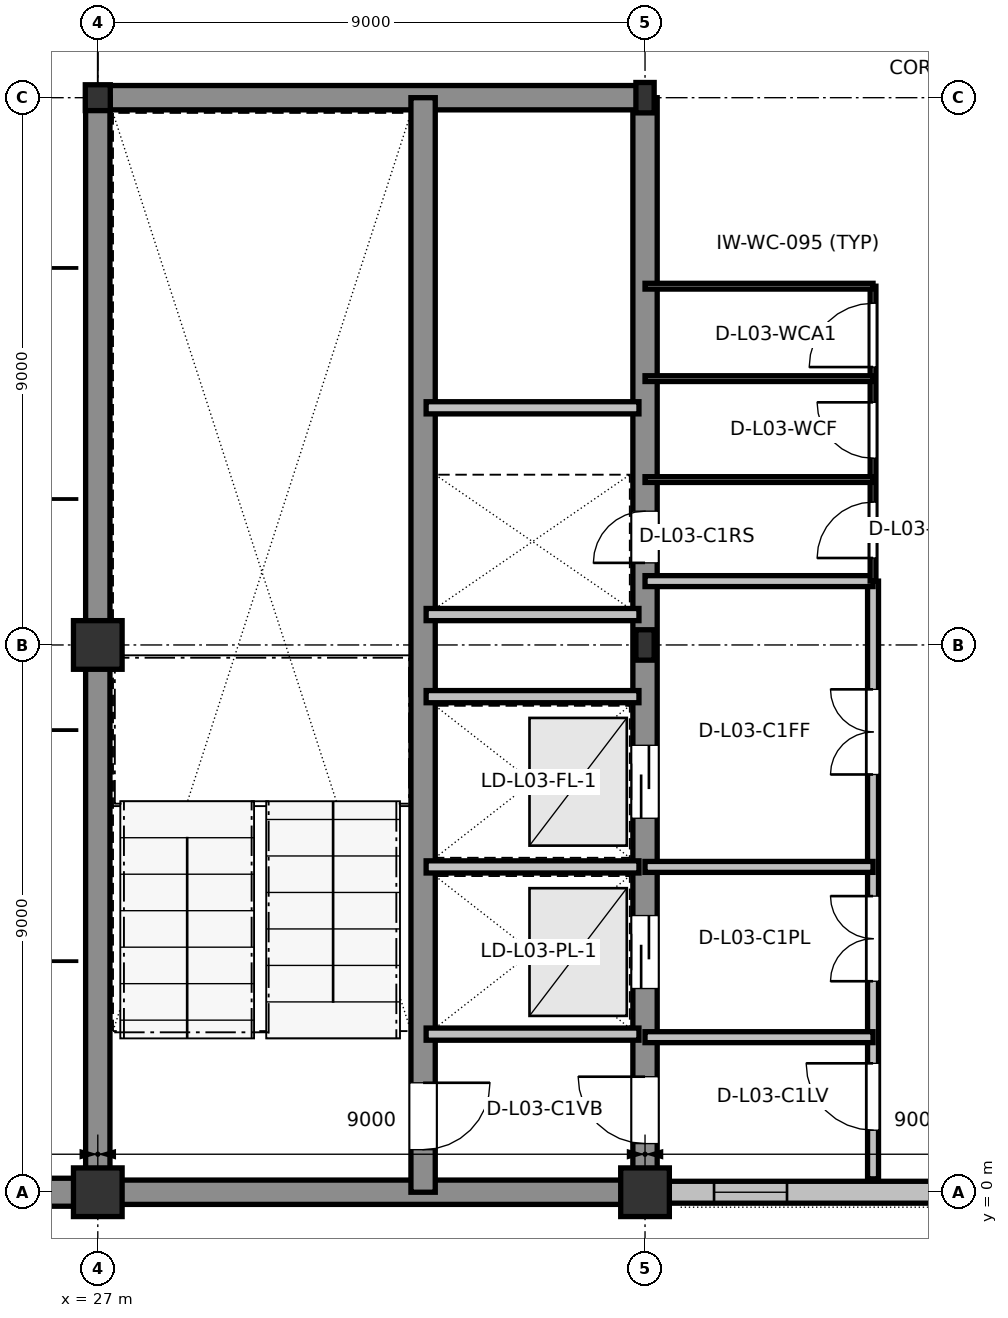
"""IFC4 building model, lengths in metres.
Left out: names, types, materials, properties, quantities, classifications, styles, units other than length and angle.
Written with IfcOpenShell. Run it as: python <this file> out.ifc"""

import sys

from ifc_helpers import new_model, si_unit, direction, frame, frame_2d, origin, origin_2d, place, context, subcontext, project, spatial, rectangle, i_section, extrude, element, fill, save


model = new_model("IFC4")
c1 = context("Model", 3, precision=1e-05, world=origin(), true_north=direction((0.0, 1.0)))
c2 = subcontext(c1, "Body", "Model", "MODEL_VIEW")
j1 = project(units=[si_unit("LENGTHUNIT", "METRE"), si_unit("PLANEANGLEUNIT", "RADIAN")], contexts=[c1])
p1 = place(None, origin())
s1 = spatial("IfcSite", under=j1, at=p1, CompositionType="ELEMENT")
p2 = place(p1, origin())
s2 = spatial("IfcBuilding", under=s1, at=p2, CompositionType="ELEMENT")
p3 = place(p2, frame((0.0, 0.0, 15.0)))
s3 = spatial("IfcBuildingStorey", under=s2, at=p3, CompositionType="ELEMENT", Elevation=15.0)
for number, where, z_axis, x_axis in (
    (1, (27.0, 0.0, 0.0), (0.0, 0.0, 1.0), (1.0, 0.0, 0.0)),
    (2, (27.0, 9.0, 0.0), (0.0, 0.0, 1.0), (1.0, 0.0, 0.0)),
):
    element("IfcColumn", number, at=place(p3, frame(where, z_axis=z_axis, x_axis=x_axis)), inside=s3, PredefinedType="COLUMN", context=c2, shape_type="SweptSolid", body=[
        extrude(rectangle(XDim=0.8, YDim=0.8, at=origin_2d()), origin(), (0.0, 0.0, 1.0), 4.2),
    ])
p4 = place(p3, frame((27.0, 18.0, 0.0), z_axis=(0.0, 0.0, 1.0), x_axis=(1.0, 0.0, 0.0)))
e3 = element("IfcColumn", 3, at=p4, inside=s3, PredefinedType="COLUMN", context=c2, shape_type="SweptSolid", body=[
    extrude(i_section(OverallWidth=0.411, OverallDepth=0.425, WebThickness=0.021, FlangeThickness=0.032, at=origin_2d()), origin(), (0.0, 0.0, 1.0), 4.2),
])
p5 = place(p3, frame((36.0, 0.0, 0.0), z_axis=(0.0, 0.0, 1.0), x_axis=(1.0, 0.0, 0.0)))
e4 = element("IfcColumn", 4, at=p5, inside=s3, PredefinedType="COLUMN", context=c2, shape_type="SweptSolid", body=[
    extrude(rectangle(XDim=0.8, YDim=0.8, at=origin_2d()), origin(), (0.0, 0.0, 1.0), 4.2),
])
for number, where, z_axis, x_axis in (
    (5, (36.0, 9.0, 0.0), (0.0, 0.0, 1.0), (1.0, 0.0, 0.0)),
    (6, (36.0, 18.0, 0.0), (0.0, 0.0, 1.0), (1.0, 0.0, 0.0)),
):
    element("IfcColumn", number, at=place(p3, frame(where, z_axis=z_axis, x_axis=x_axis)), inside=s3, PredefinedType="COLUMN", context=c2, shape_type="SweptSolid", body=[
        extrude(i_section(OverallWidth=0.3, OverallDepth=0.5, WebThickness=0.014, FlangeThickness=0.028, at=origin_2d()), origin(), (0.0, 0.0, 1.0), 4.2),
    ])
p6 = place(p3, frame((18.285, 0.0, 0.0), z_axis=(0.0, 0.0, 1.0), x_axis=(1.0, 0.0, 0.0)))
e7 = element("IfcWall", 7, at=p6, inside=s3, PredefinedType="STANDARD", context=c2, shape_type="SweptSolid", body=[
    extrude(rectangle(XDim=8.33, YDim=0.46, at=frame_2d((4.165, 0.0))), origin(), (0.0, 0.0, 1.0), 3.625),
])
p7 = place(p3, frame((36.385, 0.0, 0.0), z_axis=(0.0, 0.0, 1.0), x_axis=(1.0, 0.0, 0.0)))
e8 = element("IfcWall", 8, at=p7, inside=s3, PredefinedType="STANDARD", context=c2, shape_type="SweptSolid", body=[
    extrude(rectangle(XDim=8.23, YDim=0.36, at=frame_2d((4.115, 0.0))), origin(), (0.0, 0.0, 1.0), 3.635),
])
p8 = place(p7, frame((0.75, 0.0, 0.9)))
e9 = element("IfcOpeningElement", 9, at=p8, cuts=e8, PredefinedType="OPENING", context=c2, shape_type="SweptSolid", body=[
    extrude(rectangle(XDim=1.2, YDim=1.4, at=frame_2d((0.6, 0.7))), frame((0.0, 0.19, 0.0), z_axis=(0.0, -1.0, 0.0), x_axis=(1.0, 0.0, 0.0)), (0.0, 0.0, 1.0), 0.38),
])
p9 = place(p3, frame((27.0, 0.0, 0.0), z_axis=(0.0, 0.0, 1.0), x_axis=(1.0, 0.0, 0.0)))
e10 = element("IfcWall", 10, at=p9, inside=s3, PredefinedType="SHEAR", context=c2, shape_type="SweptSolid", body=[
    extrude(rectangle(XDim=9.0, YDim=0.4, at=frame_2d((4.5, 0.0))), origin(), (0.0, 0.0, 1.0), 3.96),
])
p10 = place(p3, frame((36.0, 0.0, 0.0), z_axis=(0.0, 0.0, 1.0), x_axis=(0.0, 1.0, 0.0)))
e11 = element("IfcWall", 11, at=p10, inside=s3, PredefinedType="SHEAR", context=c2, shape_type="SweptSolid", body=[
    extrude(rectangle(XDim=18.0, YDim=0.4, at=frame_2d((9.0, 0.0))), origin(), (0.0, 0.0, 1.0), 3.96),
])
p11 = place(p10, frame((0.8, 0.0, 0.0)))
e12 = element("IfcOpeningElement", 12, at=p11, cuts=e11, PredefinedType="OPENING", context=c2, shape_type="SweptSolid", body=[
    extrude(rectangle(XDim=1.1, YDim=2.16, at=frame_2d((0.55, 1.08))), frame((0.0, 0.21, 0.0), z_axis=(0.0, -1.0, 0.0), x_axis=(1.0, 0.0, 0.0)), (0.0, 0.0, 1.0), 0.42),
])
p12 = place(p10, frame((3.35, 0.0, 0.0)))
e13 = element("IfcOpeningElement", 13, at=p12, cuts=e11, PredefinedType="OPENING", context=c2, shape_type="SweptSolid", body=[
    extrude(rectangle(XDim=1.2, YDim=2.2, at=frame_2d((0.6, 1.1))), frame((0.0, 0.21, 0.0), z_axis=(0.0, -1.0, 0.0), x_axis=(1.0, 0.0, 0.0)), (0.0, 0.0, 1.0), 0.42),
])
p13 = place(p10, frame((6.15, 0.0, 0.0)))
e14 = element("IfcOpeningElement", 14, at=p13, cuts=e11, PredefinedType="OPENING", context=c2, shape_type="SweptSolid", body=[
    extrude(rectangle(XDim=1.2, YDim=2.2, at=frame_2d((0.6, 1.1))), frame((0.0, 0.21, 0.0), z_axis=(0.0, -1.0, 0.0), x_axis=(1.0, 0.0, 0.0)), (0.0, 0.0, 1.0), 0.42),
])
p14 = place(p10, frame((10.35, 0.0, 0.0)))
e15 = element("IfcOpeningElement", 15, at=p14, cuts=e11, PredefinedType="OPENING", context=c2, shape_type="SweptSolid", body=[
    extrude(rectangle(XDim=0.85, YDim=2.1, at=frame_2d((0.425, 1.05))), frame((0.0, 0.21, 0.0), z_axis=(0.0, -1.0, 0.0), x_axis=(1.0, 0.0, 0.0)), (0.0, 0.0, 1.0), 0.42),
])
p15 = place(p3, frame((36.0, 18.0, 0.0), z_axis=(0.0, 0.0, 1.0), x_axis=(-1.0, 0.0, 0.0)))
e16 = element("IfcWall", 16, at=p15, inside=s3, PredefinedType="SHEAR", context=c2, shape_type="SweptSolid", body=[
    extrude(rectangle(XDim=9.0, YDim=0.4, at=frame_2d((4.5, 0.0))), origin(), (0.0, 0.0, 1.0), 3.96),
])
p16 = place(p3, frame((27.0, 18.0, 0.0), z_axis=(0.0, 0.0, 1.0), x_axis=(0.0, -1.0, 0.0)))
e17 = element("IfcWall", 17, at=p16, inside=s3, PredefinedType="SHEAR", context=c2, shape_type="SweptSolid", body=[
    extrude(rectangle(XDim=18.0, YDim=0.4, at=frame_2d((9.0, 0.0))), origin(), (0.0, 0.0, 1.0), 3.96),
])
p17 = place(p3, frame((32.35, 0.0, 0.0), z_axis=(0.0, 0.0, 1.0), x_axis=(0.0, 1.0, 0.0)))
e18 = element("IfcWall", 18, at=p17, inside=s3, PredefinedType="SHEAR", context=c2, shape_type="SweptSolid", body=[
    extrude(rectangle(XDim=18.0, YDim=0.4, at=frame_2d((9.0, 0.0))), origin(), (0.0, 0.0, 1.0), 3.96),
])
p18 = place(p17, frame((0.7, 0.0, 0.0)))
e19 = element("IfcOpeningElement", 19, at=p18, cuts=e18, PredefinedType="OPENING", context=c2, shape_type="SweptSolid", body=[
    extrude(rectangle(XDim=1.1, YDim=2.16, at=frame_2d((0.55, 1.08))), frame((0.0, 0.21, 0.0), z_axis=(0.0, -1.0, 0.0), x_axis=(1.0, 0.0, 0.0)), (0.0, 0.0, 1.0), 0.42),
])
for number, where, z_axis, x_axis in (
    (20, (32.4, 2.6, 0.0), (0.0, 0.0, 1.0), (1.0, 0.0, 0.0)),
    (21, (32.4, 5.35, 0.0), (0.0, 0.0, 1.0), (1.0, 0.0, 0.0)),
    (22, (32.4, 8.15, 0.0), (0.0, 0.0, 1.0), (1.0, 0.0, 0.0)),
    (23, (32.4, 9.5, 0.0), (0.0, 0.0, 1.0), (1.0, 0.0, 0.0)),
    (24, (32.4, 12.9, 0.0), (0.0, 0.0, 1.0), (1.0, 0.0, 0.0)),
):
    element("IfcWall", number, at=place(p3, frame(where, z_axis=z_axis, x_axis=x_axis)), inside=s3, PredefinedType="PARTITIONING", context=c2, shape_type="SweptSolid", body=[
        extrude(rectangle(XDim=3.5, YDim=0.2, at=frame_2d((1.75, 0.0))), origin(), (0.0, 0.0, 1.0), 3.96),
    ])
p19 = place(p3, frame((39.75, 0.22, 0.0), z_axis=(0.0, 0.0, 1.0), x_axis=(0.0, 1.0, 0.0)))
e25 = element("IfcWall", 25, at=p19, inside=s3, PredefinedType="PARTITIONING", context=c2, shape_type="SweptSolid", body=[
    extrude(rectangle(XDim=9.83, YDim=0.18, at=frame_2d((4.915, 0.0))), origin(), (0.0, 0.0, 1.0), 3.96),
])
p20 = place(p19, frame((0.8, 0.0, 0.0)))
e26 = element("IfcOpeningElement", 26, at=p20, cuts=e25, PredefinedType="OPENING", context=c2, shape_type="SweptSolid", body=[
    extrude(rectangle(XDim=1.1, YDim=2.16, at=frame_2d((0.55, 1.08))), frame((0.0, 0.1, 0.0), z_axis=(0.0, -1.0, 0.0), x_axis=(1.0, 0.0, 0.0)), (0.0, 0.0, 1.0), 0.2),
])
p21 = place(p19, frame((3.25, 0.0, 0.0)))
e27 = element("IfcOpeningElement", 27, at=p21, cuts=e25, PredefinedType="OPENING", context=c2, shape_type="SweptSolid", body=[
    extrude(rectangle(XDim=1.4, YDim=2.2, at=frame_2d((0.7, 1.1))), frame((0.0, 0.1, 0.0), z_axis=(0.0, -1.0, 0.0), x_axis=(1.0, 0.0, 0.0)), (0.0, 0.0, 1.0), 0.2),
])
p22 = place(p19, frame((6.65, 0.0, 0.0)))
e28 = element("IfcOpeningElement", 28, at=p22, cuts=e25, PredefinedType="OPENING", context=c2, shape_type="SweptSolid", body=[
    extrude(rectangle(XDim=1.4, YDim=2.2, at=frame_2d((0.7, 1.1))), frame((0.0, 0.1, 0.0), z_axis=(0.0, -1.0, 0.0), x_axis=(1.0, 0.0, 0.0)), (0.0, 0.0, 1.0), 0.2),
])
for number, where, z_axis, x_axis in (
    (29, (36.0, 2.55, 0.0), (0.0, 0.0, 1.0), (1.0, 0.0, 0.0)),
    (30, (36.0, 5.35, 0.0), (0.0, 0.0, 1.0), (1.0, 0.0, 0.0)),
    (31, (36.0, 10.05, 0.0), (0.0, 0.0, 1.0), (1.0, 0.0, 0.0)),
):
    element("IfcWall", number, at=place(p3, frame(where, z_axis=z_axis, x_axis=x_axis)), inside=s3, PredefinedType="PARTITIONING", context=c2, shape_type="SweptSolid", body=[
        extrude(rectangle(XDim=3.75, YDim=0.18, at=frame_2d((1.875, 0.0))), origin(), (0.0, 0.0, 1.0), 3.96),
    ])
p23 = place(p3, frame((39.75, 10.05, 0.0), z_axis=(0.0, 0.0, 1.0), x_axis=(0.0, 1.0, 0.0)))
e32 = element("IfcWall", 32, at=p23, inside=s3, PredefinedType="PARTITIONING", context=c2, shape_type="SweptSolid", body=[
    extrude(rectangle(XDim=4.85, YDim=0.095, at=frame_2d((2.425, 0.0))), origin(), (0.0, 0.0, 1.0), 3.96),
])
p24 = place(p23, frame((0.38, 0.0, 0.0)))
e33 = element("IfcOpeningElement", 33, at=p24, cuts=e32, PredefinedType="OPENING", context=c2, shape_type="SweptSolid", body=[
    extrude(rectangle(XDim=0.92, YDim=2.1, at=frame_2d((0.46, 1.05))), frame((0.0, 0.057, 0.0), z_axis=(0.0, -1.0, 0.0), x_axis=(1.0, 0.0, 0.0)), (0.0, 0.0, 1.0), 0.115),
])
p25 = place(p23, frame((2.02, 0.0, 0.0)))
e34 = element("IfcOpeningElement", 34, at=p25, cuts=e32, PredefinedType="OPENING", context=c2, shape_type="SweptSolid", body=[
    extrude(rectangle(XDim=0.92, YDim=2.1, at=frame_2d((0.46, 1.05))), frame((0.0, 0.057, 0.0), z_axis=(0.0, -1.0, 0.0), x_axis=(1.0, 0.0, 0.0)), (0.0, 0.0, 1.0), 0.115),
])
p26 = place(p23, frame((3.52, 0.0, 0.0)))
e35 = element("IfcOpeningElement", 35, at=p26, cuts=e32, PredefinedType="OPENING", context=c2, shape_type="SweptSolid", body=[
    extrude(rectangle(XDim=1.05, YDim=2.13, at=frame_2d((0.525, 1.065))), frame((0.0, 0.057, 0.0), z_axis=(0.0, -1.0, 0.0), x_axis=(1.0, 0.0, 0.0)), (0.0, 0.0, 1.0), 0.115),
])
for number, where, z_axis, x_axis in (
    (36, (36.0, 11.72, 0.0), (0.0, 0.0, 1.0), (1.0, 0.0, 0.0)),
    (37, (36.0, 13.38, 0.0), (0.0, 0.0, 1.0), (1.0, 0.0, 0.0)),
):
    element("IfcWall", number, at=place(p3, frame(where, z_axis=z_axis, x_axis=x_axis)), inside=s3, PredefinedType="PARTITIONING", context=c2, shape_type="SweptSolid", body=[
        extrude(rectangle(XDim=3.75, YDim=0.095, at=frame_2d((1.875, 0.0))), origin(), (0.0, 0.0, 1.0), 3.96),
    ])
p27 = place(p3, frame((36.0, 14.9, 0.0), z_axis=(0.0, 0.0, 1.0), x_axis=(1.0, 0.0, 0.0)))
e38 = element("IfcWall", 38, at=p27, inside=s3, PredefinedType="PARTITIONING", context=c2, shape_type="SweptSolid", body=[
    extrude(rectangle(XDim=3.75, YDim=0.095, at=frame_2d((1.875, 0.0))), origin(), (0.0, 0.0, 1.0), 3.645),
])
p28 = place(p8, origin())
e39 = element("IfcWindow", 39, at=p28, inside=s3, PartitioningType="SINGLE_PANEL", PredefinedType="WINDOW", context=c2, shape_type="SweptSolid", body=[
    extrude(rectangle(XDim=1.2, YDim=1.4, at=frame_2d((0.6, 0.7))), frame((0.0, 0.03, 0.0), z_axis=(0.0, -1.0, 0.0), x_axis=(1.0, 0.0, 0.0)), (0.0, 0.0, 1.0), 0.06),
])
fill(e9, e39)
p29 = place(p18, frame((1.1, 0.0, 0.0), z_axis=(0.0, 0.0, 1.0), x_axis=(-1.0, 0.0, 0.0)))
e40 = element("IfcDoor", 40, at=p29, inside=s3, OperationType="SINGLE_SWING_LEFT", PredefinedType="DOOR", context=c2, shape_type="SweptSolid", body=[
    extrude(rectangle(XDim=1.1, YDim=2.16, at=frame_2d((0.55, 1.08))), frame((0.0, 0.025, 0.0), z_axis=(0.0, -1.0, 0.0), x_axis=(1.0, 0.0, 0.0)), (0.0, 0.0, 1.0), 0.05),
])
fill(e19, e40)
p30 = place(p11, origin())
e41 = element("IfcDoor", 41, at=p30, inside=s3, OperationType="SINGLE_SWING_RIGHT", PredefinedType="DOOR", context=c2, shape_type="SweptSolid", body=[
    extrude(rectangle(XDim=1.1, YDim=2.16, at=frame_2d((0.55, 1.08))), frame((0.0, 0.025, 0.0), z_axis=(0.0, -1.0, 0.0), x_axis=(1.0, 0.0, 0.0)), (0.0, 0.0, 1.0), 0.05),
])
fill(e12, e41)
p31 = place(p12, origin())
e42 = element("IfcDoor", 42, at=p31, inside=s3, OperationType="SLIDING_TO_LEFT", PredefinedType="DOOR", context=c2, shape_type="SweptSolid", body=[
    extrude(rectangle(XDim=1.2, YDim=2.2, at=frame_2d((0.6, 1.1))), frame((0.0, 0.025, 0.0), z_axis=(0.0, -1.0, 0.0), x_axis=(1.0, 0.0, 0.0)), (0.0, 0.0, 1.0), 0.05),
])
fill(e13, e42)
p32 = place(p13, origin())
e43 = element("IfcDoor", 43, at=p32, inside=s3, OperationType="SLIDING_TO_LEFT", PredefinedType="DOOR", context=c2, shape_type="SweptSolid", body=[
    extrude(rectangle(XDim=1.2, YDim=2.2, at=frame_2d((0.6, 1.1))), frame((0.0, 0.025, 0.0), z_axis=(0.0, -1.0, 0.0), x_axis=(1.0, 0.0, 0.0)), (0.0, 0.0, 1.0), 0.05),
])
fill(e14, e43)
p33 = place(p14, origin())
e44 = element("IfcDoor", 44, at=p33, inside=s3, OperationType="SINGLE_SWING_LEFT", PredefinedType="DOOR", context=c2, shape_type="SweptSolid", body=[
    extrude(rectangle(XDim=0.85, YDim=2.1, at=frame_2d((0.425, 1.05))), frame((0.0, 0.025, 0.0), z_axis=(0.0, -1.0, 0.0), x_axis=(1.0, 0.0, 0.0)), (0.0, 0.0, 1.0), 0.05),
])
fill(e15, e44)
p34 = place(p20, origin())
e45 = element("IfcDoor", 45, at=p34, inside=s3, OperationType="SINGLE_SWING_RIGHT", PredefinedType="DOOR", context=c2, shape_type="SweptSolid", body=[
    extrude(rectangle(XDim=1.1, YDim=2.16, at=frame_2d((0.55, 1.08))), frame((0.0, 0.025, 0.0), z_axis=(0.0, -1.0, 0.0), x_axis=(1.0, 0.0, 0.0)), (0.0, 0.0, 1.0), 0.05),
])
fill(e26, e45)
p35 = place(p21, origin())
e46 = element("IfcDoor", 46, at=p35, inside=s3, OperationType="DOUBLE_DOOR_SINGLE_SWING", PredefinedType="DOOR", context=c2, shape_type="SweptSolid", body=[
    extrude(rectangle(XDim=1.4, YDim=2.2, at=frame_2d((0.7, 1.1))), frame((0.0, 0.025, 0.0), z_axis=(0.0, -1.0, 0.0), x_axis=(1.0, 0.0, 0.0)), (0.0, 0.0, 1.0), 0.05),
])
fill(e27, e46)
p36 = place(p22, origin())
e47 = element("IfcDoor", 47, at=p36, inside=s3, OperationType="DOUBLE_DOOR_SINGLE_SWING", PredefinedType="DOOR", context=c2, shape_type="SweptSolid", body=[
    extrude(rectangle(XDim=1.4, YDim=2.2, at=frame_2d((0.7, 1.1))), frame((0.0, 0.025, 0.0), z_axis=(0.0, -1.0, 0.0), x_axis=(1.0, 0.0, 0.0)), (0.0, 0.0, 1.0), 0.05),
])
fill(e28, e47)
p37 = place(p24, origin())
e48 = element("IfcDoor", 48, at=p37, inside=s3, OperationType="SINGLE_SWING_LEFT", PredefinedType="DOOR", context=c2, shape_type="SweptSolid", body=[
    extrude(rectangle(XDim=0.92, YDim=2.1, at=frame_2d((0.46, 1.05))), frame((0.0, 0.025, 0.0), z_axis=(0.0, -1.0, 0.0), x_axis=(1.0, 0.0, 0.0)), (0.0, 0.0, 1.0), 0.05),
])
fill(e33, e48)
p38 = place(p25, origin())
e49 = element("IfcDoor", 49, at=p38, inside=s3, OperationType="SINGLE_SWING_RIGHT", PredefinedType="DOOR", context=c2, shape_type="SweptSolid", body=[
    extrude(rectangle(XDim=0.92, YDim=2.1, at=frame_2d((0.46, 1.05))), frame((0.0, 0.025, 0.0), z_axis=(0.0, -1.0, 0.0), x_axis=(1.0, 0.0, 0.0)), (0.0, 0.0, 1.0), 0.05),
])
fill(e34, e49)
p39 = place(p26, origin())
e50 = element("IfcDoor", 50, at=p39, inside=s3, OperationType="SINGLE_SWING_LEFT", PredefinedType="DOOR", context=c2, shape_type="SweptSolid", body=[
    extrude(rectangle(XDim=1.05, YDim=2.13, at=frame_2d((0.525, 1.065))), frame((0.0, 0.025, 0.0), z_axis=(0.0, -1.0, 0.0), x_axis=(1.0, 0.0, 0.0)), (0.0, 0.0, 1.0), 0.05),
])
fill(e35, e50)
save(model, sys.argv[1])
